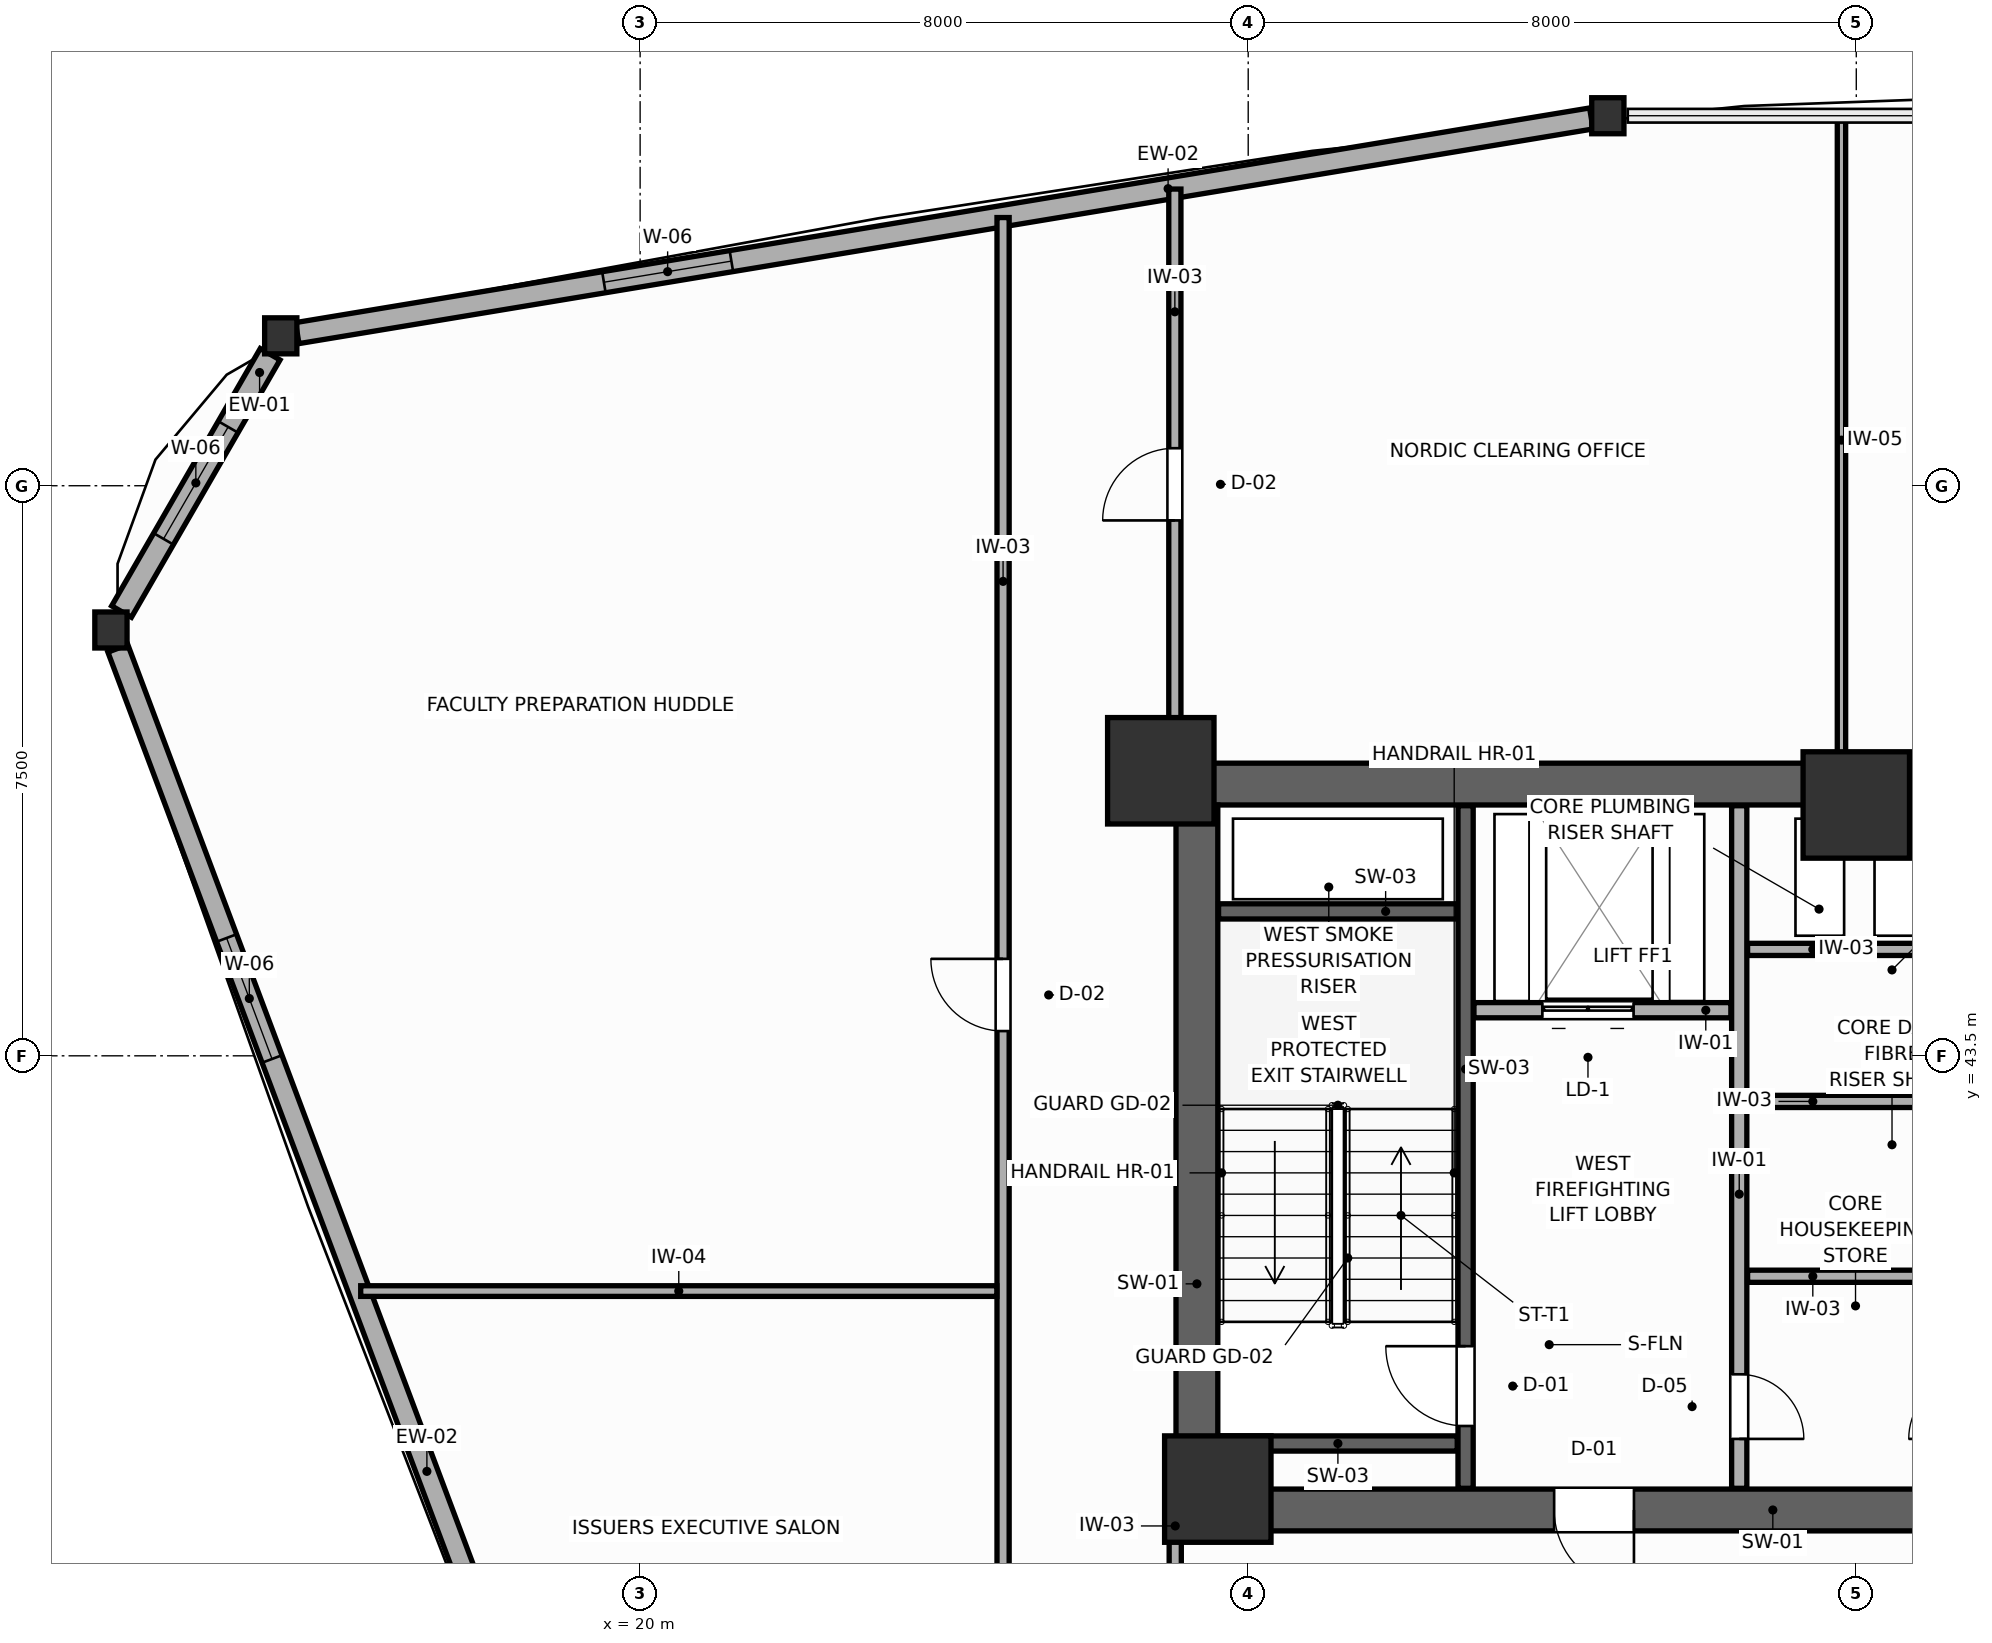
"""IFC4 building model, lengths in metres.
Left out: names, types, materials, properties, quantities, classifications, styles, units other than length and angle.
Written with IfcOpenShell. Run it as: python <this file> out.ifc"""

import sys

from ifc_helpers import new_model, si_unit, direction, frame, frame_2d, origin, origin_2d, place, context, subcontext, project, spatial, rectangle, i_section, extrude, source, transform, mapped, element, fill, save


model = new_model("IFC4")
c1 = context("Model", 3, precision=1e-05, world=origin(), true_north=direction((0.0, 1.0)))
c2 = subcontext(c1, "Body", "Model", "MODEL_VIEW")
j1 = project(units=[si_unit("LENGTHUNIT", "METRE"), si_unit("PLANEANGLEUNIT", "RADIAN")], contexts=[c1])
p1 = place(None, origin())
s1 = spatial("IfcSite", under=j1, at=p1, CompositionType="ELEMENT")
p2 = place(p1, origin())
s2 = spatial("IfcBuilding", under=s1, at=p2, CompositionType="ELEMENT")
p3 = place(p2, frame((0.0, 0.0, 83.4)))
s3 = spatial("IfcBuildingStorey", under=s2, at=p3, CompositionType="ELEMENT", Elevation=83.4)
p4 = place(p3, frame((27.05, 47.075, 0.0), z_axis=(0.0, 0.0, 1.0), x_axis=(1.0, 0.0, 0.0)))
e1 = element("IfcWall", 1, at=p4, inside=s3, PredefinedType="SHEAR", context=c2, shape_type="SweptSolid", body=[
    extrude(rectangle(XDim=17.9, YDim=0.55, at=frame_2d((8.95, 0.0))), origin(), (0.0, 0.0, 1.0), 3.9),
])
p5 = place(p3, frame((27.05, 37.525, 0.0), z_axis=(0.0, 0.0, 1.0), x_axis=(1.0, 0.0, 0.0)))
e2 = element("IfcWall", 2, at=p5, inside=s3, PredefinedType="SHEAR", context=c2, shape_type="SweptSolid", body=[
    extrude(rectangle(XDim=17.9, YDim=0.55, at=frame_2d((8.95, 0.0))), origin(), (0.0, 0.0, 1.0), 3.9),
])
p6 = place(p5, frame((4.975, 0.0, 0.0)))
e3 = element("IfcOpeningElement", 3, at=p6, cuts=e2, PredefinedType="OPENING", context=c2, shape_type="SweptSolid", body=[
    extrude(rectangle(XDim=1.05, YDim=2.1, at=frame_2d((0.525, 1.05))), frame((0.0, 0.285, 0.0), z_axis=(0.0, -1.0, 0.0), x_axis=(1.0, 0.0, 0.0)), (0.0, 0.0, 1.0), 0.57),
])
p7 = place(p5, frame((11.875, 0.0, 0.0)))
e4 = element("IfcOpeningElement", 4, at=p7, cuts=e2, PredefinedType="OPENING", context=c2, shape_type="SweptSolid", body=[
    extrude(rectangle(XDim=1.05, YDim=2.1, at=frame_2d((0.525, 1.05))), frame((0.0, 0.285, 0.0), z_axis=(0.0, -1.0, 0.0), x_axis=(1.0, 0.0, 0.0)), (0.0, 0.0, 1.0), 0.57),
])
p8 = place(p3, frame((27.325, 37.8, 0.0), z_axis=(0.0, 0.0, 1.0), x_axis=(0.0, 1.0, 0.0)))
e5 = element("IfcWall", 5, at=p8, inside=s3, PredefinedType="SHEAR", context=c2, shape_type="SweptSolid", body=[
    extrude(rectangle(XDim=9.0, YDim=0.55, at=frame_2d((4.5, 0.0))), origin(), (0.0, 0.0, 1.0), 3.9),
])
m1 = source(origin(), c2, "Body", "SweptSolid", [
    extrude(rectangle(XDim=1.4, YDim=1.4, at=origin_2d()), origin(), (0.0, 0.0, 1.0), 3.9),
])
for number, where, z_axis, x_axis in (
    (6, (26.85, 47.25, 0.0), (0.0, 0.0, 1.0), (1.0, 0.0, 0.0)),
    (7, (27.6, 37.8, 0.0), (0.0, 0.0, 1.0), (1.0, 0.0, 0.0)),
    (8, (36.0, 46.8, 0.0), (0.0, 0.0, 1.0), (1.0, 0.0, 0.0)),
):
    element("IfcColumn", number, at=place(p3, frame(where, z_axis=z_axis, x_axis=x_axis)), inside=s3, PredefinedType="COLUMN", context=c2, shape_type="MappedRepresentation", body=[
        mapped(m1, transform((0.0, 0.0, 0.0), scale=1.0)),
    ])
m2 = source(origin(), c2, "Body", "SweptSolid", [
    extrude(i_section(OverallWidth=0.424, OverallDepth=0.474, WebThickness=0.045, FlangeThickness=0.072, FilletRadius=0.015, at=origin_2d()), origin(), (0.0, 0.0, 1.0), 3.9),
])
for number, where, z_axis, x_axis in (
    (9, (32.731, 55.868, 0.0), (0.0, 0.0, 1.0), (1.0, 0.0, 0.0)),
    (10, (15.272, 52.972, 0.0), (0.0, 0.0, 1.0), (1.0, 0.0, 0.0)),
    (11, (13.038, 49.102, 0.0), (0.0, 0.0, 1.0), (1.0, 0.0, 0.0)),
):
    element("IfcColumn", number, at=place(p3, frame(where, z_axis=z_axis, x_axis=x_axis)), inside=s3, PredefinedType="COLUMN", context=c2, shape_type="MappedRepresentation", body=[
        mapped(m2, transform((0.0, 0.0, 0.0), scale=1.0)),
    ])
p9 = place(p3, frame((32.514, 55.832, 0.0), z_axis=(0.0, 0.0, 1.0), x_axis=(-0.986523610756, -0.163618964122, 0.0)))
e12 = element("IfcWall", 12, at=p9, inside=s3, PredefinedType="SOLIDWALL", context=c2, shape_type="SweptSolid", body=[
    extrude(rectangle(XDim=17.258, YDim=0.28, at=frame_2d((8.629, 0.0))), origin(), (0.0, 0.0, 1.0), 2.08),
])
p10 = place(p9, frame((11.469, 0.0, 0.75)))
e13 = element("IfcOpeningElement", 13, at=p10, cuts=e12, PredefinedType="OPENING", context=c2, shape_type="SweptSolid", body=[
    extrude(rectangle(XDim=1.7, YDim=1.15, at=frame_2d((0.85, 0.575))), frame((0.0, 0.15, 0.0), z_axis=(0.0, -1.0, 0.0), x_axis=(1.0, 0.0, 0.0)), (0.0, 0.0, 1.0), 0.3),
])
p11 = place(p3, frame((15.132, 52.73, 0.0), z_axis=(0.0, 0.0, 1.0), x_axis=(-0.500014353419, -0.866017116675, 0.0)))
e14 = element("IfcWall", 14, at=p11, inside=s3, PredefinedType="SOLIDWALL", context=c2, shape_type="SweptSolid", body=[
    extrude(rectangle(XDim=3.91, YDim=0.3, at=frame_2d((1.955, 0.0))), origin(), (0.0, 0.0, 1.0), 2.08),
])
p12 = place(p11, frame((1.105, 0.0, 0.75)))
e15 = element("IfcOpeningElement", 15, at=p12, cuts=e14, PredefinedType="OPENING", context=c2, shape_type="SweptSolid", body=[
    extrude(rectangle(XDim=1.7, YDim=1.15, at=frame_2d((0.85, 0.575))), frame((0.0, 0.16, 0.0), z_axis=(0.0, -1.0, 0.0), x_axis=(1.0, 0.0, 0.0)), (0.0, 0.0, 1.0), 0.32),
])
p13 = place(p3, frame((13.129, 48.86, 0.0), z_axis=(0.0, 0.0, 1.0), x_axis=(0.351559441404, -0.936165561832, 0.0)))
e16 = element("IfcWall", 16, at=p13, inside=s3, PredefinedType="SOLIDWALL", context=c2, shape_type="SweptSolid", body=[
    extrude(rectangle(XDim=17.181, YDim=0.28, at=frame_2d((8.59, 0.0))), origin(), (0.0, 0.0, 1.0), 2.08),
])
p14 = place(p13, frame((4.07, 0.0, 0.75)))
e17 = element("IfcOpeningElement", 17, at=p14, cuts=e16, PredefinedType="OPENING", context=c2, shape_type="SweptSolid", body=[
    extrude(rectangle(XDim=1.7, YDim=1.15, at=frame_2d((0.85, 0.575))), frame((0.0, 0.15, 0.0), z_axis=(0.0, -1.0, 0.0), x_axis=(1.0, 0.0, 0.0)), (0.0, 0.0, 1.0), 0.3),
])
p15 = place(p3, frame((30.86, 37.81, 0.0), z_axis=(0.0, 0.0, 1.0), x_axis=(0.0, 1.0, 0.0)))
e18 = element("IfcWall", 18, at=p15, inside=s3, PredefinedType="SHEAR", context=c2, shape_type="SweptSolid", body=[
    extrude(rectangle(XDim=8.98, YDim=0.2, at=frame_2d((4.49, 0.0))), origin(), (0.0, 0.0, 1.0), 3.9),
])
p16 = place(p15, frame((0.82, 0.0, 0.0)))
e19 = element("IfcOpeningElement", 19, at=p16, cuts=e18, PredefinedType="OPENING", context=c2, shape_type="SweptSolid", body=[
    extrude(rectangle(XDim=1.05, YDim=2.1, at=frame_2d((0.525, 1.05))), frame((0.0, 0.11, 0.0), z_axis=(0.0, -1.0, 0.0), x_axis=(1.0, 0.0, 0.0)), (0.0, 0.0, 1.0), 0.22),
])
for number, where, z_axis, x_axis in (
    (20, (27.61, 45.4, 0.0), (0.0, 0.0, 1.0), (1.0, 0.0, 0.0)),
    (21, (27.61, 38.4, 0.0), (0.0, 0.0, 1.0), (1.0, 0.0, 0.0)),
):
    element("IfcWall", number, at=place(p3, frame(where, z_axis=z_axis, x_axis=x_axis)), inside=s3, PredefinedType="SHEAR", context=c2, shape_type="SweptSolid", body=[
        extrude(rectangle(XDim=3.14, YDim=0.2, at=frame_2d((1.57, 0.0))), origin(), (0.0, 0.0, 1.0), 3.9),
    ])
p17 = place(p3, frame((30.97, 44.1, 0.0), z_axis=(0.0, 0.0, 1.0), x_axis=(1.0, 0.0, 0.0)))
e22 = element("IfcWall", 22, at=p17, inside=s3, PredefinedType="PARTITIONING", context=c2, shape_type="SweptSolid", body=[
    extrude(rectangle(XDim=3.38, YDim=0.2, at=frame_2d((1.69, 0.0))), origin(), (0.0, 0.0, 1.0), 3.68),
])
p18 = place(p17, frame((0.9, 0.0, 0.0)))
e23 = element("IfcOpeningElement", 23, at=p18, cuts=e22, PredefinedType="OPENING", context=c2, shape_type="SweptSolid", body=[
    extrude(rectangle(XDim=1.2, YDim=2.1, at=frame_2d((0.6, 1.05))), frame((0.0, 0.11, 0.0), z_axis=(0.0, -1.0, 0.0), x_axis=(1.0, 0.0, 0.0)), (0.0, 0.0, 1.0), 0.22),
])
p19 = place(p3, frame((34.46, 37.81, 0.0), z_axis=(0.0, 0.0, 1.0), x_axis=(0.0, 1.0, 0.0)))
e24 = element("IfcWall", 24, at=p19, inside=s3, PredefinedType="PARTITIONING", context=c2, shape_type="SweptSolid", body=[
    extrude(rectangle(XDim=8.98, YDim=0.2, at=frame_2d((4.49, 0.0))), origin(), (0.0, 0.0, 1.0), 3.68),
])
p20 = place(p19, frame((0.65, 0.0, 0.0)))
e25 = element("IfcOpeningElement", 25, at=p20, cuts=e24, PredefinedType="OPENING", context=c2, shape_type="SweptSolid", body=[
    extrude(rectangle(XDim=0.85, YDim=2.05, at=frame_2d((0.425, 1.025))), frame((0.0, 0.11, 0.0), z_axis=(0.0, -1.0, 0.0), x_axis=(1.0, 0.0, 0.0)), (0.0, 0.0, 1.0), 0.22),
])
for number, where, z_axis, x_axis in (
    (26, (34.57, 40.6, 0.0), (0.0, 0.0, 1.0), (1.0, 0.0, 0.0)),
    (27, (34.57, 42.9, 0.0), (0.0, 0.0, 1.0), (1.0, 0.0, 0.0)),
    (28, (34.57, 44.9, 0.0), (0.0, 0.0, 1.0), (1.0, 0.0, 0.0)),
):
    element("IfcWall", number, at=place(p3, frame(where, z_axis=z_axis, x_axis=x_axis)), inside=s3, PredefinedType="PARTITIONING", context=c2, shape_type="SweptSolid", body=[
        extrude(rectangle(XDim=2.86, YDim=0.16, at=frame_2d((1.43, 0.0))), origin(), (0.0, 0.0, 1.0), 3.68),
    ])
p21 = place(p3, frame((27.04, 35.0, 0.0), z_axis=(0.0, 0.0, 1.0), x_axis=(0.0, 1.0, 0.0)))
e29 = element("IfcWall", 29, at=p21, inside=s3, PredefinedType="PARTITIONING", context=c2, shape_type="SweptSolid", body=[
    extrude(rectangle(XDim=2.65, YDim=0.16, at=frame_2d((1.325, 0.0))), origin(), (0.0, 0.0, 1.0), 3.68),
])
p22 = place(p21, frame((0.75, 0.0, 0.0)))
e30 = element("IfcOpeningElement", 30, at=p22, cuts=e29, PredefinedType="OPENING", context=c2, shape_type="SweptSolid", body=[
    extrude(rectangle(XDim=1.05, YDim=2.1, at=frame_2d((0.525, 1.05))), frame((0.0, 0.09, 0.0), z_axis=(0.0, -1.0, 0.0), x_axis=(1.0, 0.0, 0.0)), (0.0, 0.0, 1.0), 0.18),
])
p23 = place(p3, frame((24.775, 32.31, 0.0), z_axis=(0.0, 0.0, 1.0), x_axis=(0.0, 1.0, 0.0)))
e31 = element("IfcWall", 31, at=p23, inside=s3, PredefinedType="PARTITIONING", context=c2, shape_type="SweptSolid", body=[
    extrude(rectangle(XDim=22.218, YDim=0.16, at=frame_2d((11.109, 0.0))), origin(), (0.0, 0.0, 1.0), 3.68),
])
p24 = place(p23, frame((3.005, 0.0, 0.0)))
e32 = element("IfcOpeningElement", 32, at=p24, cuts=e31, PredefinedType="OPENING", context=c2, shape_type="SweptSolid", body=[
    extrude(rectangle(XDim=0.95, YDim=2.05, at=frame_2d((0.475, 1.025))), frame((0.0, 0.09, 0.0), z_axis=(0.0, -1.0, 0.0), x_axis=(1.0, 0.0, 0.0)), (0.0, 0.0, 1.0), 0.18),
])
p25 = place(p23, frame((11.516, 0.0, 0.0)))
e33 = element("IfcOpeningElement", 33, at=p25, cuts=e31, PredefinedType="OPENING", context=c2, shape_type="SweptSolid", body=[
    extrude(rectangle(XDim=0.95, YDim=2.05, at=frame_2d((0.475, 1.025))), frame((0.0, 0.09, 0.0), z_axis=(0.0, -1.0, 0.0), x_axis=(1.0, 0.0, 0.0)), (0.0, 0.0, 1.0), 0.18),
])
p26 = place(p3, frame((27.035, 47.34, 0.0), z_axis=(0.0, 0.0, 1.0), x_axis=(0.0, 1.0, 0.0)))
e34 = element("IfcWall", 34, at=p26, inside=s3, PredefinedType="PARTITIONING", context=c2, shape_type="SweptSolid", body=[
    extrude(rectangle(XDim=7.563, YDim=0.16, at=frame_2d((3.781, 0.0))), origin(), (0.0, 0.0, 1.0), 3.68),
])
p27 = place(p26, frame((3.204, 0.0, 0.0)))
e35 = element("IfcOpeningElement", 35, at=p27, cuts=e34, PredefinedType="OPENING", context=c2, shape_type="SweptSolid", body=[
    extrude(rectangle(XDim=0.95, YDim=2.05, at=frame_2d((0.475, 1.025))), frame((0.0, 0.09, 0.0), z_axis=(0.0, -1.0, 0.0), x_axis=(1.0, 0.0, 0.0)), (0.0, 0.0, 1.0), 0.18),
])
p28 = place(p3, frame((35.805, 47.352, 0.0), z_axis=(0.0, 0.0, 1.0), x_axis=(0.0, 1.0, 0.0)))
e36 = element("IfcWall", 36, at=p28, inside=s3, PredefinedType="MOVABLE", context=c2, shape_type="SweptSolid", body=[
    extrude(rectangle(XDim=8.496, YDim=0.11, at=frame_2d((4.248, 0.0))), origin(), (0.0, 0.0, 1.0), 3.68),
])
p29 = place(p3, frame((16.324, 40.405, 0.0), z_axis=(0.0, 0.0, 1.0), x_axis=(1.0, 0.0, 0.0)))
e37 = element("IfcWall", 37, at=p29, inside=s3, PredefinedType="PARTITIONING", context=c2, shape_type="SweptSolid", body=[
    extrude(rectangle(XDim=8.369, YDim=0.14, at=frame_2d((4.185, 0.0))), origin(), (0.0, 0.0, 1.0), 3.68),
])
p30 = place(p10, origin())
e38 = element("IfcWindow", 38, at=p30, inside=s3, PartitioningType="SINGLE_PANEL", PredefinedType="WINDOW", context=c2, shape_type="SweptSolid", body=[
    extrude(rectangle(XDim=1.7, YDim=1.15, at=frame_2d((0.85, 0.575))), frame((0.0, 0.03, 0.0), z_axis=(0.0, -1.0, 0.0), x_axis=(1.0, 0.0, 0.0)), (0.0, 0.0, 1.0), 0.06),
])
fill(e13, e38)
p31 = place(p12, origin())
e39 = element("IfcWindow", 39, at=p31, inside=s3, PartitioningType="SINGLE_PANEL", PredefinedType="WINDOW", context=c2, shape_type="SweptSolid", body=[
    extrude(rectangle(XDim=1.7, YDim=1.15, at=frame_2d((0.85, 0.575))), frame((0.0, 0.03, 0.0), z_axis=(0.0, -1.0, 0.0), x_axis=(1.0, 0.0, 0.0)), (0.0, 0.0, 1.0), 0.06),
])
fill(e15, e39)
p32 = place(p14, origin())
e40 = element("IfcWindow", 40, at=p32, inside=s3, PartitioningType="SINGLE_PANEL", PredefinedType="WINDOW", context=c2, shape_type="SweptSolid", body=[
    extrude(rectangle(XDim=1.7, YDim=1.15, at=frame_2d((0.85, 0.575))), frame((0.0, 0.03, 0.0), z_axis=(0.0, -1.0, 0.0), x_axis=(1.0, 0.0, 0.0)), (0.0, 0.0, 1.0), 0.06),
])
fill(e17, e40)
p33 = place(p16, origin())
e41 = element("IfcDoor", 41, at=p33, inside=s3, OperationType="SINGLE_SWING_RIGHT", PredefinedType="DOOR", context=c2, shape_type="SweptSolid", body=[
    extrude(rectangle(XDim=1.05, YDim=2.1, at=frame_2d((0.525, 1.05))), frame((0.0, 0.025, 0.0), z_axis=(0.0, -1.0, 0.0), x_axis=(1.0, 0.0, 0.0)), (0.0, 0.0, 1.0), 0.05),
])
fill(e19, e41)
p34 = place(p18, origin())
e42 = element("IfcDoor", 42, at=p34, inside=s3, OperationType="DOUBLE_DOOR_SLIDING", PredefinedType="DOOR", context=c2, shape_type="SweptSolid", body=[
    extrude(rectangle(XDim=1.2, YDim=2.1, at=frame_2d((0.6, 1.05))), frame((0.0, 0.025, 0.0), z_axis=(0.0, -1.0, 0.0), x_axis=(1.0, 0.0, 0.0)), (0.0, 0.0, 1.0), 0.05),
])
fill(e23, e42)
p35 = place(p20, frame((0.85, 0.0, 0.0), z_axis=(0.0, 0.0, 1.0), x_axis=(-1.0, 0.0, 0.0)))
e43 = element("IfcDoor", 43, at=p35, inside=s3, OperationType="SINGLE_SWING_RIGHT", PredefinedType="DOOR", context=c2, shape_type="SweptSolid", body=[
    extrude(rectangle(XDim=0.85, YDim=2.05, at=frame_2d((0.425, 1.025))), frame((0.0, 0.025, 0.0), z_axis=(0.0, -1.0, 0.0), x_axis=(1.0, 0.0, 0.0)), (0.0, 0.0, 1.0), 0.05),
])
fill(e25, e43)
p36 = place(p25, origin())
e44 = element("IfcDoor", 44, at=p36, inside=s3, OperationType="SINGLE_SWING_RIGHT", PredefinedType="DOOR", context=c2, shape_type="SweptSolid", body=[
    extrude(rectangle(XDim=0.95, YDim=2.05, at=frame_2d((0.475, 1.025))), frame((0.0, 0.025, 0.0), z_axis=(0.0, -1.0, 0.0), x_axis=(1.0, 0.0, 0.0)), (0.0, 0.0, 1.0), 0.05),
])
fill(e33, e44)
p37 = place(p27, origin())
e45 = element("IfcDoor", 45, at=p37, inside=s3, OperationType="SINGLE_SWING_LEFT", PredefinedType="DOOR", context=c2, shape_type="SweptSolid", body=[
    extrude(rectangle(XDim=0.95, YDim=2.05, at=frame_2d((0.475, 1.025))), frame((0.0, 0.025, 0.0), z_axis=(0.0, -1.0, 0.0), x_axis=(1.0, 0.0, 0.0)), (0.0, 0.0, 1.0), 0.05),
])
fill(e35, e45)
p38 = place(p6, frame((1.05, 0.0, 0.0), z_axis=(0.0, 0.0, 1.0), x_axis=(-1.0, 0.0, 0.0)))
e46 = element("IfcDoor", 46, at=p38, inside=s3, OperationType="SINGLE_SWING_LEFT", PredefinedType="DOOR", context=c2, shape_type="SweptSolid", body=[
    extrude(rectangle(XDim=1.05, YDim=2.1, at=frame_2d((0.525, 1.05))), frame((0.0, 0.025, 0.0), z_axis=(0.0, -1.0, 0.0), x_axis=(1.0, 0.0, 0.0)), (0.0, 0.0, 1.0), 0.05),
])
fill(e3, e46)
save(model, sys.argv[1])
